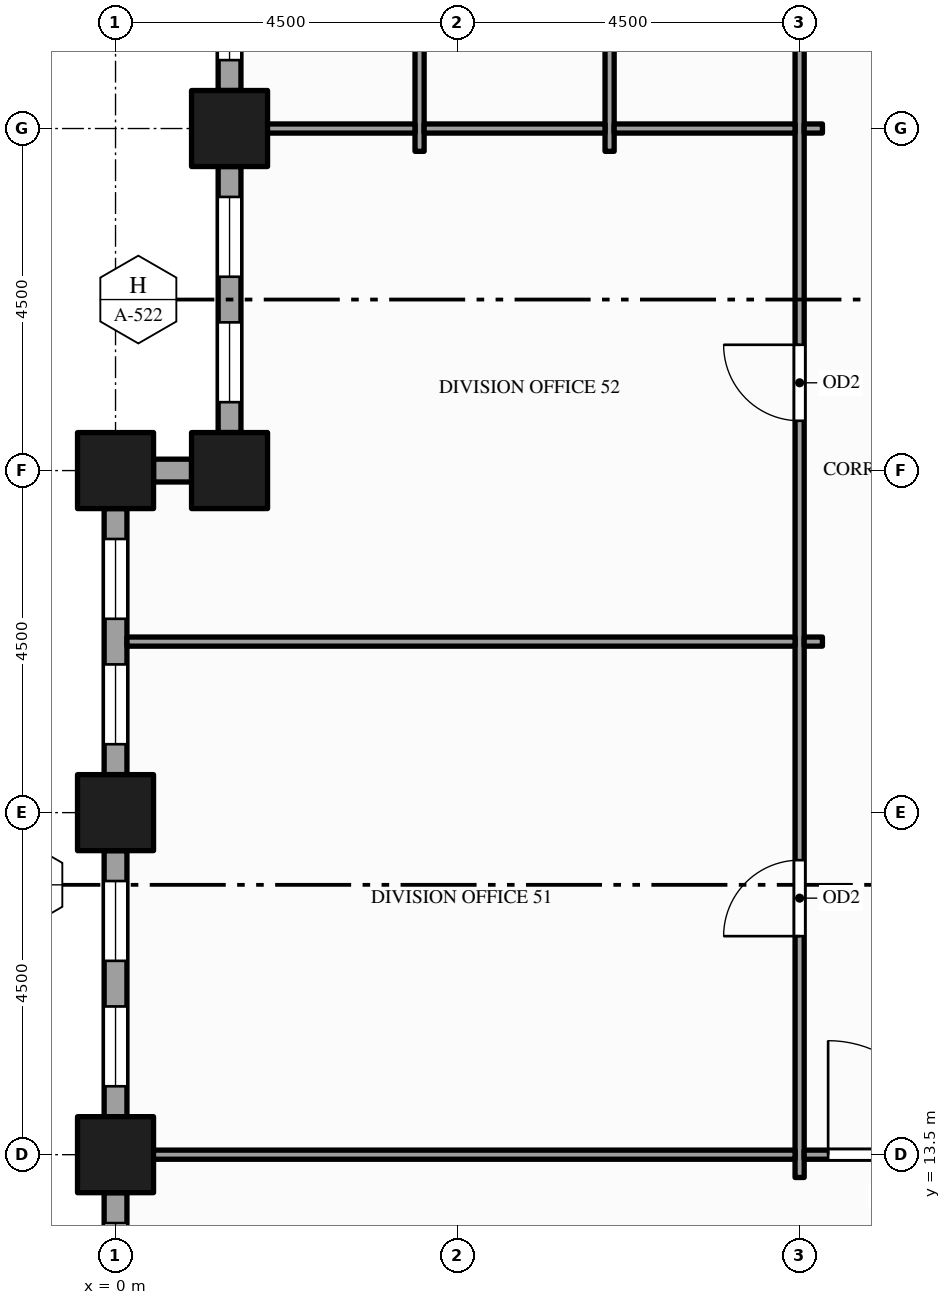
"""IFC4 building model, lengths in metres.
Left out: names, types, materials, properties, quantities, classifications, styles, units other than length and angle.
Written with IfcOpenShell. Run it as: python <this file> out.ifc"""

import sys

from ifc_helpers import new_model, si_unit, direction, frame, frame_2d, origin, origin_2d, place, context, subcontext, project, spatial, rectangle, hollow_rectangle, extrude, element, fill, save


model = new_model("IFC4")
c1 = context("Model", 3, precision=1e-05, world=origin(), true_north=direction((0.0, 1.0)))
c2 = subcontext(c1, "Body", "Model", "MODEL_VIEW")
j1 = project(units=[si_unit("LENGTHUNIT", "METRE"), si_unit("PLANEANGLEUNIT", "RADIAN")], contexts=[c1])
p1 = place(None, origin())
s1 = spatial("IfcSite", under=j1, at=p1, CompositionType="ELEMENT")
p2 = place(p1, origin())
s2 = spatial("IfcBuilding", under=s1, at=p2, CompositionType="ELEMENT")
p3 = place(p2, frame((0.0, 0.0, 123.0)))
s3 = spatial("IfcBuildingStorey", under=s2, at=p3, CompositionType="ELEMENT", Elevation=123.0)
for number, where, z_axis, x_axis in (
    (1, (0.0, 13.5, -0.15), (0.0, 0.0, 1.0), (1.0, 0.0, 0.0)),
    (2, (0.0, 18.0, -0.15), (0.0, 0.0, 1.0), (1.0, 0.0, 0.0)),
    (3, (0.0, 22.5, -0.15), (0.0, 0.0, 1.0), (1.0, 0.0, 0.0)),
    (4, (1.5, 22.5, -0.15), (0.0, 0.0, 1.0), (1.0, 0.0, 0.0)),
    (5, (1.5, 27.0, -0.15), (0.0, 0.0, 1.0), (1.0, 0.0, 0.0)),
):
    element("IfcColumn", number, at=place(p3, frame(where, z_axis=z_axis, x_axis=x_axis)), inside=s3, PredefinedType="COLUMN", context=c2, shape_type="SweptSolid", body=[
        extrude(hollow_rectangle(XDim=1.0, YDim=1.0, WallThickness=0.05, at=origin_2d()), origin(), (0.0, 0.0, 1.0), 4.0),
    ])
p4 = place(p3, frame((1.5, 31.0, 0.0), z_axis=(0.0, 0.0, 1.0), x_axis=(0.0, -1.0, 0.0)))
e6 = element("IfcWall", 6, at=p4, inside=s3, PredefinedType="STANDARD", context=c2, shape_type="SweptSolid", body=[
    extrude(rectangle(XDim=3.5, YDim=0.3, at=frame_2d((1.75, 0.0))), origin(), (0.0, 0.0, 1.0), 3.154),
])
p5 = place(p4, frame((0.4, 0.0, 0.9)))
e7 = element("IfcOpeningElement", 7, at=p5, cuts=e6, PredefinedType="OPENING", context=c2, shape_type="SweptSolid", body=[
    extrude(rectangle(XDim=1.05, YDim=2.0, at=frame_2d((0.525, 1.0))), frame((0.0, 0.16, 0.0), z_axis=(0.0, -1.0, 0.0), x_axis=(1.0, 0.0, 0.0)), (0.0, 0.0, 1.0), 0.32),
])
p6 = place(p4, frame((2.05, 0.0, 0.9)))
e8 = element("IfcOpeningElement", 8, at=p6, cuts=e6, PredefinedType="OPENING", context=c2, shape_type="SweptSolid", body=[
    extrude(rectangle(XDim=1.05, YDim=2.0, at=frame_2d((0.525, 1.0))), frame((0.0, 0.16, 0.0), z_axis=(0.0, -1.0, 0.0), x_axis=(1.0, 0.0, 0.0)), (0.0, 0.0, 1.0), 0.32),
])
p7 = place(p3, frame((1.5, 26.5, 0.0), z_axis=(0.0, 0.0, 1.0), x_axis=(0.0, -1.0, 0.0)))
e9 = element("IfcWall", 9, at=p7, inside=s3, PredefinedType="STANDARD", context=c2, shape_type="SweptSolid", body=[
    extrude(rectangle(XDim=3.5, YDim=0.3, at=frame_2d((1.75, 0.0))), origin(), (0.0, 0.0, 1.0), 3.154),
])
p8 = place(p7, frame((0.4, 0.0, 0.9)))
e10 = element("IfcOpeningElement", 10, at=p8, cuts=e9, PredefinedType="OPENING", context=c2, shape_type="SweptSolid", body=[
    extrude(rectangle(XDim=1.05, YDim=2.0, at=frame_2d((0.525, 1.0))), frame((0.0, 0.16, 0.0), z_axis=(0.0, -1.0, 0.0), x_axis=(1.0, 0.0, 0.0)), (0.0, 0.0, 1.0), 0.32),
])
p9 = place(p7, frame((2.05, 0.0, 0.9)))
e11 = element("IfcOpeningElement", 11, at=p9, cuts=e9, PredefinedType="OPENING", context=c2, shape_type="SweptSolid", body=[
    extrude(rectangle(XDim=1.05, YDim=2.0, at=frame_2d((0.525, 1.0))), frame((0.0, 0.16, 0.0), z_axis=(0.0, -1.0, 0.0), x_axis=(1.0, 0.0, 0.0)), (0.0, 0.0, 1.0), 0.32),
])
p10 = place(p3, frame((1.0, 22.5, 0.0), z_axis=(0.0, 0.0, 1.0), x_axis=(-1.0, 0.0, 0.0)))
e12 = element("IfcWall", 12, at=p10, inside=s3, PredefinedType="STANDARD", context=c2, shape_type="SweptSolid", body=[
    extrude(rectangle(XDim=0.5, YDim=0.3, at=frame_2d((0.25, 0.0))), origin(), (0.0, 0.0, 1.0), 3.154),
])
p11 = place(p3, frame((0.0, 22.0, 0.0), z_axis=(0.0, 0.0, 1.0), x_axis=(0.0, -1.0, 0.0)))
e13 = element("IfcWall", 13, at=p11, inside=s3, PredefinedType="STANDARD", context=c2, shape_type="SweptSolid", body=[
    extrude(rectangle(XDim=3.5, YDim=0.3, at=frame_2d((1.75, 0.0))), origin(), (0.0, 0.0, 1.0), 3.154),
])
p12 = place(p11, frame((0.4, 0.0, 0.9)))
e14 = element("IfcOpeningElement", 14, at=p12, cuts=e13, PredefinedType="OPENING", context=c2, shape_type="SweptSolid", body=[
    extrude(rectangle(XDim=1.05, YDim=2.0, at=frame_2d((0.525, 1.0))), frame((0.0, 0.16, 0.0), z_axis=(0.0, -1.0, 0.0), x_axis=(1.0, 0.0, 0.0)), (0.0, 0.0, 1.0), 0.32),
])
p13 = place(p11, frame((2.05, 0.0, 0.9)))
e15 = element("IfcOpeningElement", 15, at=p13, cuts=e13, PredefinedType="OPENING", context=c2, shape_type="SweptSolid", body=[
    extrude(rectangle(XDim=1.05, YDim=2.0, at=frame_2d((0.525, 1.0))), frame((0.0, 0.16, 0.0), z_axis=(0.0, -1.0, 0.0), x_axis=(1.0, 0.0, 0.0)), (0.0, 0.0, 1.0), 0.32),
])
p14 = place(p3, frame((0.0, 17.5, 0.0), z_axis=(0.0, 0.0, 1.0), x_axis=(0.0, -1.0, 0.0)))
e16 = element("IfcWall", 16, at=p14, inside=s3, PredefinedType="STANDARD", context=c2, shape_type="SweptSolid", body=[
    extrude(rectangle(XDim=3.5, YDim=0.3, at=frame_2d((1.75, 0.0))), origin(), (0.0, 0.0, 1.0), 3.154),
])
p15 = place(p14, frame((0.4, 0.0, 0.9)))
e17 = element("IfcOpeningElement", 17, at=p15, cuts=e16, PredefinedType="OPENING", context=c2, shape_type="SweptSolid", body=[
    extrude(rectangle(XDim=1.05, YDim=2.0, at=frame_2d((0.525, 1.0))), frame((0.0, 0.16, 0.0), z_axis=(0.0, -1.0, 0.0), x_axis=(1.0, 0.0, 0.0)), (0.0, 0.0, 1.0), 0.32),
])
p16 = place(p14, frame((2.05, 0.0, 0.9)))
e18 = element("IfcOpeningElement", 18, at=p16, cuts=e16, PredefinedType="OPENING", context=c2, shape_type="SweptSolid", body=[
    extrude(rectangle(XDim=1.05, YDim=2.0, at=frame_2d((0.525, 1.0))), frame((0.0, 0.16, 0.0), z_axis=(0.0, -1.0, 0.0), x_axis=(1.0, 0.0, 0.0)), (0.0, 0.0, 1.0), 0.32),
])
p17 = place(p3, frame((0.0, 13.0, 0.0), z_axis=(0.0, 0.0, 1.0), x_axis=(0.0, -1.0, 0.0)))
e19 = element("IfcWall", 19, at=p17, inside=s3, PredefinedType="STANDARD", context=c2, shape_type="SweptSolid", body=[
    extrude(rectangle(XDim=3.5, YDim=0.3, at=frame_2d((1.75, 0.0))), origin(), (0.0, 0.0, 1.0), 3.154),
])
p18 = place(p17, frame((0.4, 0.0, 0.9)))
e20 = element("IfcOpeningElement", 20, at=p18, cuts=e19, PredefinedType="OPENING", context=c2, shape_type="SweptSolid", body=[
    extrude(rectangle(XDim=1.05, YDim=2.0, at=frame_2d((0.525, 1.0))), frame((0.0, 0.16, 0.0), z_axis=(0.0, -1.0, 0.0), x_axis=(1.0, 0.0, 0.0)), (0.0, 0.0, 1.0), 0.32),
])
p19 = place(p17, frame((2.05, 0.0, 0.9)))
e21 = element("IfcOpeningElement", 21, at=p19, cuts=e19, PredefinedType="OPENING", context=c2, shape_type="SweptSolid", body=[
    extrude(rectangle(XDim=1.05, YDim=2.0, at=frame_2d((0.525, 1.0))), frame((0.0, 0.16, 0.0), z_axis=(0.0, -1.0, 0.0), x_axis=(1.0, 0.0, 0.0)), (0.0, 0.0, 1.0), 0.32),
])
for number, where, z_axis, x_axis in (
    (22, (4.0, 26.7, 0.0), (0.0, 0.0, 1.0), (0.0, 1.0, 0.0)),
    (23, (6.5, 26.7, 0.0), (0.0, 0.0, 1.0), (0.0, 1.0, 0.0)),
):
    element("IfcWall", number, at=place(p3, frame(where, z_axis=z_axis, x_axis=x_axis)), inside=s3, PredefinedType="PARTITIONING", context=c2, shape_type="SweptSolid", body=[
        extrude(rectangle(XDim=5.1, YDim=0.12, at=frame_2d((2.55, 0.0))), origin(), (0.0, 0.0, 1.0), 3.85),
    ])
p20 = place(p3, frame((9.0, 13.2, 0.0), z_axis=(0.0, 0.0, 1.0), x_axis=(0.0, 1.0, 0.0)))
e24 = element("IfcWall", 24, at=p20, inside=s3, PredefinedType="PARTITIONING", context=c2, shape_type="SweptSolid", body=[
    extrude(rectangle(XDim=18.6, YDim=0.12, at=frame_2d((9.3, 0.0))), origin(), (0.0, 0.0, 1.0), 2.6),
])
p21 = place(p20, frame((3.175, 0.0, 0.0)))
e25 = element("IfcOpeningElement", 25, at=p21, cuts=e24, PredefinedType="OPENING", context=c2, shape_type="SweptSolid", body=[
    extrude(rectangle(XDim=1.0, YDim=2.1, at=frame_2d((0.5, 1.05))), frame((0.0, 0.07, 0.0), z_axis=(0.0, -1.0, 0.0), x_axis=(1.0, 0.0, 0.0)), (0.0, 0.0, 1.0), 0.14),
])
p22 = place(p20, frame((9.955, 0.0, 0.0)))
e26 = element("IfcOpeningElement", 26, at=p22, cuts=e24, PredefinedType="OPENING", context=c2, shape_type="SweptSolid", body=[
    extrude(rectangle(XDim=1.0, YDim=2.1, at=frame_2d((0.5, 1.05))), frame((0.0, 0.07, 0.0), z_axis=(0.0, -1.0, 0.0), x_axis=(1.0, 0.0, 0.0)), (0.0, 0.0, 1.0), 0.14),
])
p23 = place(p3, frame((0.15, 13.5, 0.0), z_axis=(0.0, 0.0, 1.0), x_axis=(1.0, 0.0, 0.0)))
e27 = element("IfcWall", 27, at=p23, inside=s3, PredefinedType="PARTITIONING", context=c2, shape_type="SweptSolid", body=[
    extrude(rectangle(XDim=8.79, YDim=0.12, at=frame_2d((4.395, 0.0))), origin(), (0.0, 0.0, 1.0), 2.938),
])
p24 = place(p3, frame((9.06, 13.5, 0.0), z_axis=(0.0, 0.0, 1.0), x_axis=(1.0, 0.0, 0.0)))
e28 = element("IfcWall", 28, at=p24, inside=s3, PredefinedType="PARTITIONING", context=c2, shape_type="SweptSolid", body=[
    extrude(rectangle(XDim=2.13, YDim=0.12, at=frame_2d((1.065, 0.0))), origin(), (0.0, 0.0, 1.0), 2.938),
])
p25 = place(p24, frame((0.315, 0.0, 0.0)))
e29 = element("IfcOpeningElement", 29, at=p25, cuts=e28, PredefinedType="OPENING", context=c2, shape_type="SweptSolid", body=[
    extrude(rectangle(XDim=1.5, YDim=2.1, at=frame_2d((0.75, 1.05))), frame((0.0, 0.07, 0.0), z_axis=(0.0, -1.0, 0.0), x_axis=(1.0, 0.0, 0.0)), (0.0, 0.0, 1.0), 0.14),
])
p26 = place(p3, frame((0.15, 20.25, 0.0), z_axis=(0.0, 0.0, 1.0), x_axis=(1.0, 0.0, 0.0)))
e30 = element("IfcWall", 30, at=p26, inside=s3, PredefinedType="PARTITIONING", context=c2, shape_type="SweptSolid", body=[
    extrude(rectangle(XDim=8.79, YDim=0.12, at=frame_2d((4.395, 0.0))), origin(), (0.0, 0.0, 1.0), 2.938),
])
p27 = place(p3, frame((9.06, 20.25, 0.0), z_axis=(0.0, 0.0, 1.0), x_axis=(1.0, 0.0, 0.0)))
e31 = element("IfcWall", 31, at=p27, inside=s3, PredefinedType="PARTITIONING", context=c2, shape_type="SweptSolid", body=[
    extrude(rectangle(XDim=0.24, YDim=0.12, at=frame_2d((0.12, 0.0))), origin(), (0.0, 0.0, 1.0), 2.938),
])
p28 = place(p3, frame((1.65, 27.0, 0.0), z_axis=(0.0, 0.0, 1.0), x_axis=(1.0, 0.0, 0.0)))
e32 = element("IfcWall", 32, at=p28, inside=s3, PredefinedType="PARTITIONING", context=c2, shape_type="SweptSolid", body=[
    extrude(rectangle(XDim=2.29, YDim=0.12, at=frame_2d((1.145, 0.0))), origin(), (0.0, 0.0, 1.0), 2.938),
])
for number, where, z_axis, x_axis in (
    (33, (4.06, 27.0, 0.0), (0.0, 0.0, 1.0), (1.0, 0.0, 0.0)),
    (34, (6.56, 27.0, 0.0), (0.0, 0.0, 1.0), (1.0, 0.0, 0.0)),
):
    element("IfcWall", number, at=place(p3, frame(where, z_axis=z_axis, x_axis=x_axis)), inside=s3, PredefinedType="PARTITIONING", context=c2, shape_type="SweptSolid", body=[
        extrude(rectangle(XDim=2.38, YDim=0.12, at=frame_2d((1.19, 0.0))), origin(), (0.0, 0.0, 1.0), 2.938),
    ])
p29 = place(p3, frame((9.06, 27.0, 0.0), z_axis=(0.0, 0.0, 1.0), x_axis=(1.0, 0.0, 0.0)))
e35 = element("IfcWall", 35, at=p29, inside=s3, PredefinedType="PARTITIONING", context=c2, shape_type="SweptSolid", body=[
    extrude(rectangle(XDim=0.24, YDim=0.12, at=frame_2d((0.12, 0.0))), origin(), (0.0, 0.0, 1.0), 2.938),
])
p30 = place(p6, origin())
e36 = element("IfcWindow", 36, at=p30, inside=s3, PartitioningType="SINGLE_PANEL", PredefinedType="WINDOW", context=c2, shape_type="SweptSolid", body=[
    extrude(rectangle(XDim=1.05, YDim=2.0, at=frame_2d((0.525, 1.0))), frame((0.0, 0.03, 0.0), z_axis=(0.0, -1.0, 0.0), x_axis=(1.0, 0.0, 0.0)), (0.0, 0.0, 1.0), 0.06),
])
fill(e8, e36)
p31 = place(p8, origin())
e37 = element("IfcWindow", 37, at=p31, inside=s3, PartitioningType="SINGLE_PANEL", PredefinedType="WINDOW", context=c2, shape_type="SweptSolid", body=[
    extrude(rectangle(XDim=1.05, YDim=2.0, at=frame_2d((0.525, 1.0))), frame((0.0, 0.03, 0.0), z_axis=(0.0, -1.0, 0.0), x_axis=(1.0, 0.0, 0.0)), (0.0, 0.0, 1.0), 0.06),
])
fill(e10, e37)
p32 = place(p9, origin())
e38 = element("IfcWindow", 38, at=p32, inside=s3, PartitioningType="SINGLE_PANEL", PredefinedType="WINDOW", context=c2, shape_type="SweptSolid", body=[
    extrude(rectangle(XDim=1.05, YDim=2.0, at=frame_2d((0.525, 1.0))), frame((0.0, 0.03, 0.0), z_axis=(0.0, -1.0, 0.0), x_axis=(1.0, 0.0, 0.0)), (0.0, 0.0, 1.0), 0.06),
])
fill(e11, e38)
p33 = place(p12, origin())
e39 = element("IfcWindow", 39, at=p33, inside=s3, PartitioningType="SINGLE_PANEL", PredefinedType="WINDOW", context=c2, shape_type="SweptSolid", body=[
    extrude(rectangle(XDim=1.05, YDim=2.0, at=frame_2d((0.525, 1.0))), frame((0.0, 0.03, 0.0), z_axis=(0.0, -1.0, 0.0), x_axis=(1.0, 0.0, 0.0)), (0.0, 0.0, 1.0), 0.06),
])
fill(e14, e39)
p34 = place(p13, origin())
e40 = element("IfcWindow", 40, at=p34, inside=s3, PartitioningType="SINGLE_PANEL", PredefinedType="WINDOW", context=c2, shape_type="SweptSolid", body=[
    extrude(rectangle(XDim=1.05, YDim=2.0, at=frame_2d((0.525, 1.0))), frame((0.0, 0.03, 0.0), z_axis=(0.0, -1.0, 0.0), x_axis=(1.0, 0.0, 0.0)), (0.0, 0.0, 1.0), 0.06),
])
fill(e15, e40)
p35 = place(p15, origin())
e41 = element("IfcWindow", 41, at=p35, inside=s3, PartitioningType="SINGLE_PANEL", PredefinedType="WINDOW", context=c2, shape_type="SweptSolid", body=[
    extrude(rectangle(XDim=1.05, YDim=2.0, at=frame_2d((0.525, 1.0))), frame((0.0, 0.03, 0.0), z_axis=(0.0, -1.0, 0.0), x_axis=(1.0, 0.0, 0.0)), (0.0, 0.0, 1.0), 0.06),
])
fill(e17, e41)
p36 = place(p16, origin())
e42 = element("IfcWindow", 42, at=p36, inside=s3, PartitioningType="SINGLE_PANEL", PredefinedType="WINDOW", context=c2, shape_type="SweptSolid", body=[
    extrude(rectangle(XDim=1.05, YDim=2.0, at=frame_2d((0.525, 1.0))), frame((0.0, 0.03, 0.0), z_axis=(0.0, -1.0, 0.0), x_axis=(1.0, 0.0, 0.0)), (0.0, 0.0, 1.0), 0.06),
])
fill(e18, e42)
p37 = place(p18, origin())
e43 = element("IfcWindow", 43, at=p37, inside=s3, PartitioningType="SINGLE_PANEL", PredefinedType="WINDOW", context=c2, shape_type="SweptSolid", body=[
    extrude(rectangle(XDim=1.05, YDim=2.0, at=frame_2d((0.525, 1.0))), frame((0.0, 0.03, 0.0), z_axis=(0.0, -1.0, 0.0), x_axis=(1.0, 0.0, 0.0)), (0.0, 0.0, 1.0), 0.06),
])
fill(e20, e43)
p38 = place(p25, origin())
e44 = element("IfcDoor", 44, at=p38, inside=s3, OperationType="SINGLE_SWING_LEFT", PredefinedType="DOOR", context=c2, shape_type="SweptSolid", body=[
    extrude(rectangle(XDim=1.5, YDim=2.1, at=frame_2d((0.75, 1.05))), frame((0.0, 0.025, 0.0), z_axis=(0.0, -1.0, 0.0), x_axis=(1.0, 0.0, 0.0)), (0.0, 0.0, 1.0), 0.05),
])
fill(e29, e44)
p39 = place(p21, origin())
e45 = element("IfcDoor", 45, at=p39, inside=s3, OperationType="SINGLE_SWING_LEFT", PredefinedType="DOOR", context=c2, shape_type="SweptSolid", body=[
    extrude(rectangle(XDim=1.0, YDim=2.1, at=frame_2d((0.5, 1.05))), frame((0.0, 0.025, 0.0), z_axis=(0.0, -1.0, 0.0), x_axis=(1.0, 0.0, 0.0)), (0.0, 0.0, 1.0), 0.05),
])
fill(e25, e45)
p40 = place(p22, origin())
e46 = element("IfcDoor", 46, at=p40, inside=s3, OperationType="SINGLE_SWING_RIGHT", PredefinedType="DOOR", context=c2, shape_type="SweptSolid", body=[
    extrude(rectangle(XDim=1.0, YDim=2.1, at=frame_2d((0.5, 1.05))), frame((0.0, 0.025, 0.0), z_axis=(0.0, -1.0, 0.0), x_axis=(1.0, 0.0, 0.0)), (0.0, 0.0, 1.0), 0.05),
])
fill(e26, e46)
save(model, sys.argv[1])
